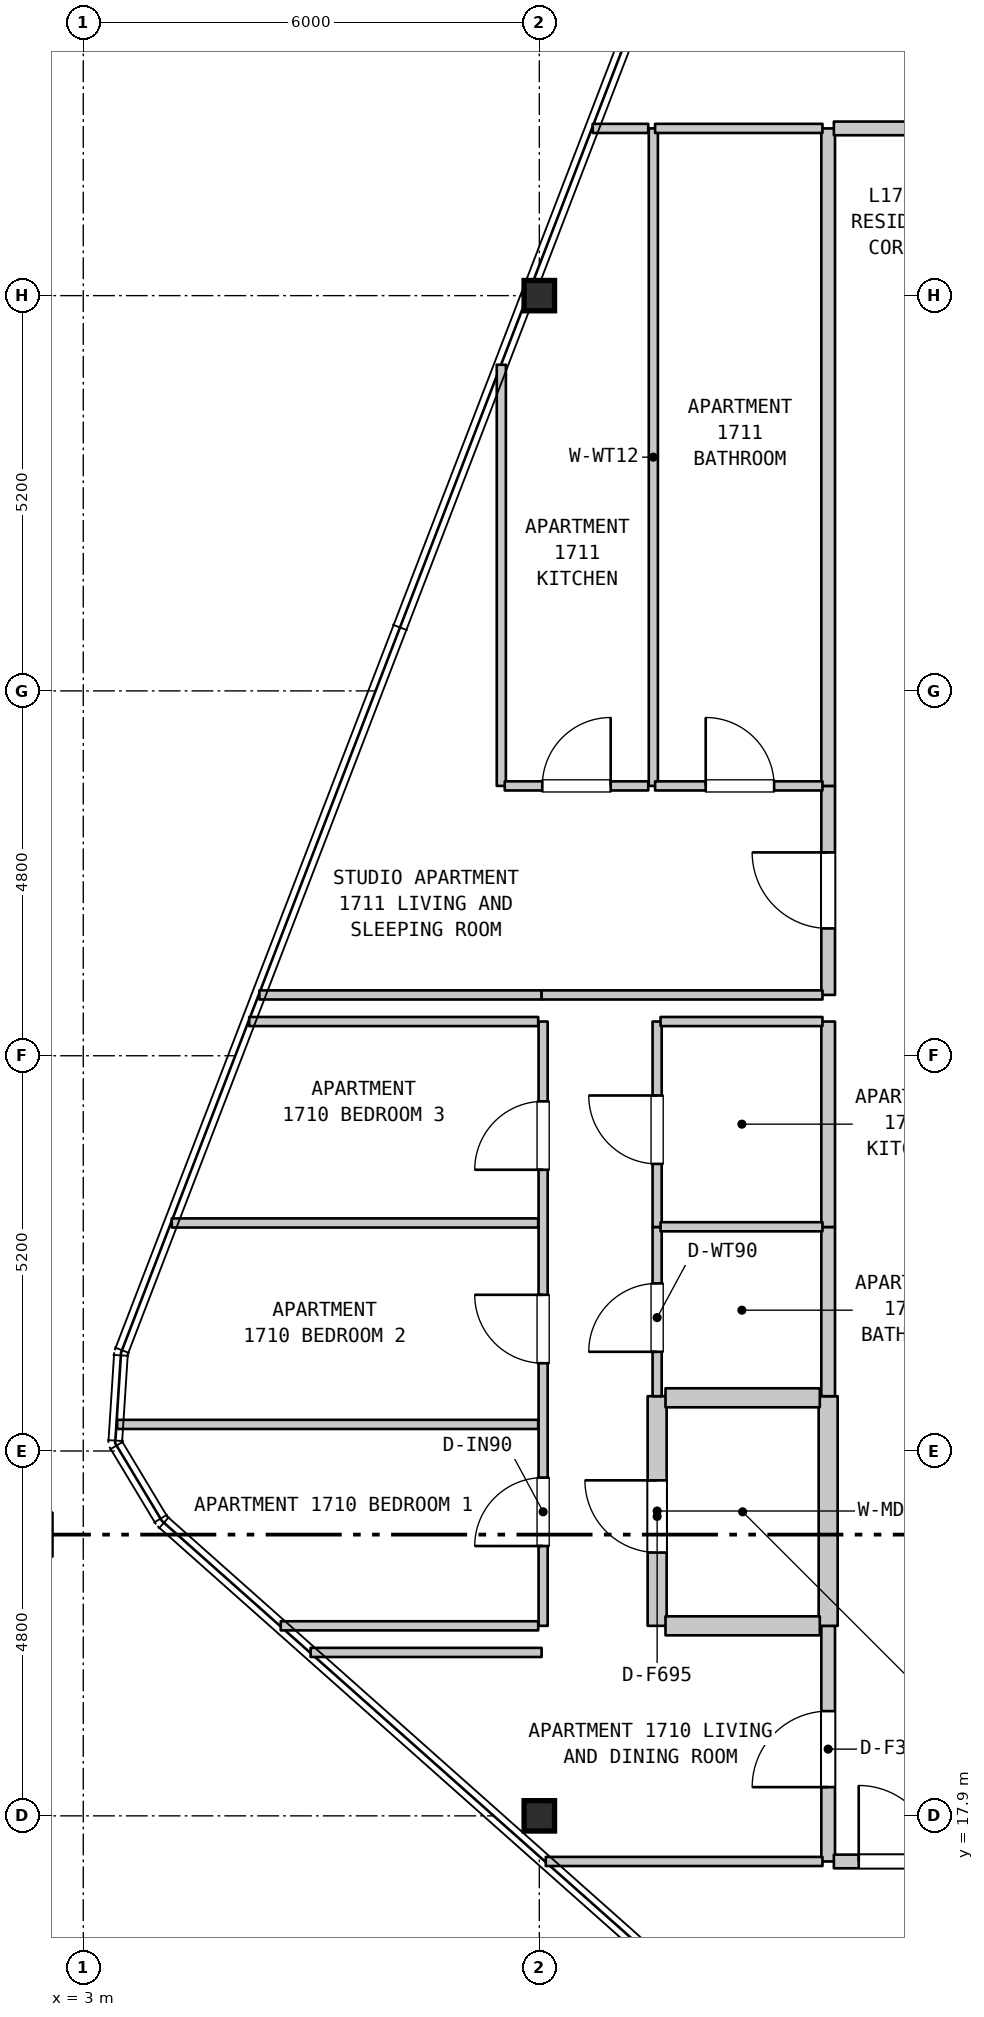
"""IFC4 building model, lengths in metres.
Left out: names, types, materials, properties, quantities, classifications, styles, units other than length and angle.
Written with IfcOpenShell. Run it as: python <this file> out.ifc"""

import sys

from ifc_helpers import new_model, si_unit, direction, frame, frame_2d, origin, origin_2d, place, context, subcontext, project, spatial, rectangle, i_section, extrude, element, fill, save


model = new_model("IFC4")
c1 = context("Model", 3, precision=1e-05, world=origin(), true_north=direction((0.0, 1.0)))
c2 = subcontext(c1, "Body", "Model", "MODEL_VIEW")
j1 = project(units=[si_unit("LENGTHUNIT", "METRE"), si_unit("PLANEANGLEUNIT", "RADIAN")], contexts=[c1])
p1 = place(None, origin())
s1 = spatial("IfcSite", under=j1, at=p1, CompositionType="ELEMENT")
p2 = place(p1, origin())
s2 = spatial("IfcBuilding", under=s1, at=p2, CompositionType="ELEMENT")
p3 = place(p2, frame((0.0, 0.0, 73.8)))
s3 = spatial("IfcBuildingStorey", under=s2, at=p3, CompositionType="ELEMENT", Elevation=73.8)
for number, where, z_axis, x_axis in (
    (1, (9.0, 17.9, 0.0), (0.0, 0.0, 1.0), (1.0, 0.0, 0.0)),
    (2, (9.0, 37.9, 0.0), (0.0, 0.0, 1.0), (1.0, 0.0, 0.0)),
):
    element("IfcColumn", number, at=place(p3, frame(where, z_axis=z_axis, x_axis=x_axis)), inside=s3, PredefinedType="COLUMN", context=c2, shape_type="SweptSolid", body=[
        extrude(i_section(OverallWidth=0.401, OverallDepth=0.399, WebThickness=0.025, FlangeThickness=0.04, FilletRadius=0.015, at=origin_2d()), origin(), (0.0, 0.0, 1.0), 3.7),
    ])
p4 = place(p3, frame((8.5, 31.45, 0.0), z_axis=(0.0, 0.0, 1.0), x_axis=(0.0, 1.0, 0.0)))
e3 = element("IfcWall", 3, at=p4, inside=s3, PredefinedType="PARTITIONING", context=c2, shape_type="SweptSolid", body=[
    extrude(rectangle(XDim=5.54, YDim=0.12, at=frame_2d((2.77, 0.0))), origin(), (0.0, 0.0, 1.0), 3.385),
])
p5 = place(p3, frame((9.05, 20.4, 0.0), z_axis=(0.0, 0.0, 1.0), x_axis=(0.0, 1.0, 0.0)))
e4 = element("IfcWall", 4, at=p5, inside=s3, PredefinedType="PARTITIONING", context=c2, shape_type="SweptSolid", body=[
    extrude(rectangle(XDim=7.95, YDim=0.12, at=frame_2d((3.975, 0.0))), origin(), (0.0, 0.0, 1.0), 2.785),
])
p6 = place(p5, frame((1.05, 0.0, 0.0)))
e5 = element("IfcOpeningElement", 5, at=p6, cuts=e4, PredefinedType="OPENING", context=c2, shape_type="SweptSolid", body=[
    extrude(rectangle(XDim=0.9, YDim=2.15, at=frame_2d((0.45, 1.075))), frame((0.0, 0.07, 0.0), z_axis=(0.0, -1.0, 0.0), x_axis=(1.0, 0.0, 0.0)), (0.0, 0.0, 1.0), 0.14),
])
p7 = place(p5, frame((3.455, 0.0, 0.0)))
e6 = element("IfcOpeningElement", 6, at=p7, cuts=e4, PredefinedType="OPENING", context=c2, shape_type="SweptSolid", body=[
    extrude(rectangle(XDim=0.9, YDim=2.15, at=frame_2d((0.45, 1.075))), frame((0.0, 0.07, 0.0), z_axis=(0.0, -1.0, 0.0), x_axis=(1.0, 0.0, 0.0)), (0.0, 0.0, 1.0), 0.14),
])
p8 = place(p5, frame((6.0, 0.0, 0.0)))
e7 = element("IfcOpeningElement", 7, at=p8, cuts=e4, PredefinedType="OPENING", context=c2, shape_type="SweptSolid", body=[
    extrude(rectangle(XDim=0.9, YDim=2.15, at=frame_2d((0.45, 1.075))), frame((0.0, 0.07, 0.0), z_axis=(0.0, -1.0, 0.0), x_axis=(1.0, 0.0, 0.0)), (0.0, 0.0, 1.0), 0.14),
])
p9 = place(p3, frame((10.5, 31.45, 0.0), z_axis=(0.0, 0.0, 1.0), x_axis=(0.0, 1.0, 0.0)))
e8 = element("IfcWall", 8, at=p9, inside=s3, PredefinedType="PARTITIONING", context=c2, shape_type="SweptSolid", body=[
    extrude(rectangle(XDim=8.65, YDim=0.12, at=frame_2d((4.325, 0.0))), origin(), (0.0, 0.0, 1.0), 3.385),
])
p10 = place(p3, frame((10.55, 20.4, 0.0), z_axis=(0.0, 0.0, 1.0), x_axis=(0.0, 1.0, 0.0)))
e9 = element("IfcWall", 9, at=p10, inside=s3, PredefinedType="STANDARD", context=c2, shape_type="SweptSolid", body=[
    extrude(rectangle(XDim=3.021, YDim=0.25, at=frame_2d((1.51, 0.0))), origin(), (0.0, 0.0, 1.0), 3.385),
])
p11 = place(p10, frame((0.964, 0.0, 0.0)))
e10 = element("IfcOpeningElement", 10, at=p11, cuts=e9, PredefinedType="OPENING", context=c2, shape_type="SweptSolid", body=[
    extrude(rectangle(XDim=0.95, YDim=2.15, at=frame_2d((0.475, 1.075))), frame((0.0, 0.135, 0.0), z_axis=(0.0, -1.0, 0.0), x_axis=(1.0, 0.0, 0.0)), (0.0, 0.0, 1.0), 0.27),
])
p12 = place(p3, frame((10.55, 23.421, 0.0), z_axis=(0.0, 0.0, 1.0), x_axis=(0.0, 1.0, 0.0)))
e11 = element("IfcWall", 11, at=p12, inside=s3, PredefinedType="PARTITIONING", context=c2, shape_type="SweptSolid", body=[
    extrude(rectangle(XDim=2.226, YDim=0.12, at=frame_2d((1.113, 0.0))), origin(), (0.0, 0.0, 1.0), 3.385),
])
p13 = place(p12, frame((0.584, 0.0, 0.0)))
e12 = element("IfcOpeningElement", 12, at=p13, cuts=e11, PredefinedType="OPENING", context=c2, shape_type="SweptSolid", body=[
    extrude(rectangle(XDim=0.9, YDim=2.1, at=frame_2d((0.45, 1.05))), frame((0.0, 0.07, 0.0), z_axis=(0.0, -1.0, 0.0), x_axis=(1.0, 0.0, 0.0)), (0.0, 0.0, 1.0), 0.14),
])
p14 = place(p3, frame((10.55, 25.647, 0.0), z_axis=(0.0, 0.0, 1.0), x_axis=(0.0, 1.0, 0.0)))
e13 = element("IfcWall", 13, at=p14, inside=s3, PredefinedType="PARTITIONING", context=c2, shape_type="SweptSolid", body=[
    extrude(rectangle(XDim=2.703, YDim=0.12, at=frame_2d((1.352, 0.0))), origin(), (0.0, 0.0, 1.0), 3.385),
])
p15 = place(p14, frame((0.83, 0.0, 0.0)))
e14 = element("IfcOpeningElement", 14, at=p15, cuts=e13, PredefinedType="OPENING", context=c2, shape_type="SweptSolid", body=[
    extrude(rectangle(XDim=0.9, YDim=2.15, at=frame_2d((0.45, 1.075))), frame((0.0, 0.07, 0.0), z_axis=(0.0, -1.0, 0.0), x_axis=(1.0, 0.0, 0.0)), (0.0, 0.0, 1.0), 0.14),
])
p16 = place(p3, frame((12.8, 17.3, 0.0), z_axis=(0.0, 0.0, 1.0), x_axis=(0.0, 1.0, 0.0)))
e15 = element("IfcWall", 15, at=p16, inside=s3, PredefinedType="STANDARD", context=c2, shape_type="SweptSolid", body=[
    extrude(rectangle(XDim=3.1, YDim=0.18, at=frame_2d((1.55, 0.0))), origin(), (0.0, 0.0, 1.0), 3.385),
])
p17 = place(p16, frame((0.978, 0.0, 0.0)))
e16 = element("IfcOpeningElement", 16, at=p17, cuts=e15, PredefinedType="OPENING", context=c2, shape_type="SweptSolid", body=[
    extrude(rectangle(XDim=1.0, YDim=2.15, at=frame_2d((0.5, 1.075))), frame((0.0, 0.1, 0.0), z_axis=(0.0, -1.0, 0.0), x_axis=(1.0, 0.0, 0.0)), (0.0, 0.0, 1.0), 0.2),
])
p18 = place(p3, frame((12.8, 20.4, 0.0), z_axis=(0.0, 0.0, 1.0), x_axis=(0.0, 1.0, 0.0)))
e17 = element("IfcWall", 17, at=p18, inside=s3, PredefinedType="STANDARD", context=c2, shape_type="SweptSolid", body=[
    extrude(rectangle(XDim=3.021, YDim=0.25, at=frame_2d((1.51, 0.0))), origin(), (0.0, 0.0, 1.0), 3.385),
])
p19 = place(p3, frame((12.8, 23.421, 0.0), z_axis=(0.0, 0.0, 1.0), x_axis=(0.0, 1.0, 0.0)))
e18 = element("IfcWall", 18, at=p19, inside=s3, PredefinedType="STANDARD", context=c2, shape_type="SweptSolid", body=[
    extrude(rectangle(XDim=2.226, YDim=0.18, at=frame_2d((1.113, 0.0))), origin(), (0.0, 0.0, 1.0), 3.385),
])
p20 = place(p3, frame((12.8, 25.647, 0.0), z_axis=(0.0, 0.0, 1.0), x_axis=(0.0, 1.0, 0.0)))
e19 = element("IfcWall", 19, at=p20, inside=s3, PredefinedType="STANDARD", context=c2, shape_type="SweptSolid", body=[
    extrude(rectangle(XDim=2.703, YDim=0.18, at=frame_2d((1.352, 0.0))), origin(), (0.0, 0.0, 1.0), 3.385),
])
p21 = place(p3, frame((12.8, 28.7, 0.0), z_axis=(0.0, 0.0, 1.0), x_axis=(0.0, 1.0, 0.0)))
e20 = element("IfcWall", 20, at=p21, inside=s3, PredefinedType="STANDARD", context=c2, shape_type="SweptSolid", body=[
    extrude(rectangle(XDim=2.75, YDim=0.18, at=frame_2d((1.375, 0.0))), origin(), (0.0, 0.0, 1.0), 3.385),
])
p22 = place(p21, frame((0.875, 0.0, 0.0)))
e21 = element("IfcOpeningElement", 21, at=p22, cuts=e20, PredefinedType="OPENING", context=c2, shape_type="SweptSolid", body=[
    extrude(rectangle(XDim=1.0, YDim=2.15, at=frame_2d((0.5, 1.075))), frame((0.0, 0.1, 0.0), z_axis=(0.0, -1.0, 0.0), x_axis=(1.0, 0.0, 0.0)), (0.0, 0.0, 1.0), 0.2),
])
p23 = place(p3, frame((12.8, 31.45, 0.0), z_axis=(0.0, 0.0, 1.0), x_axis=(0.0, 1.0, 0.0)))
e22 = element("IfcWall", 22, at=p23, inside=s3, PredefinedType="STANDARD", context=c2, shape_type="SweptSolid", body=[
    extrude(rectangle(XDim=8.65, YDim=0.18, at=frame_2d((4.325, 0.0))), origin(), (0.0, 0.0, 1.0), 3.385),
])
p24 = place(p3, frame((9.085, 17.3, 0.0), z_axis=(0.0, 0.0, 1.0), x_axis=(1.0, 0.0, 0.0)))
e23 = element("IfcWall", 23, at=p24, inside=s3, PredefinedType="PARTITIONING", context=c2, shape_type="SweptSolid", body=[
    extrude(rectangle(XDim=3.64, YDim=0.12, at=frame_2d((1.82, 0.0))), origin(), (0.0, 0.0, 1.0), 3.385),
])
p25 = place(p3, frame((12.875, 17.3, 0.0), z_axis=(0.0, 0.0, 1.0), x_axis=(1.0, 0.0, 0.0)))
e24 = element("IfcWall", 24, at=p25, inside=s3, PredefinedType="STANDARD", context=c2, shape_type="SweptSolid", body=[
    extrude(rectangle(XDim=3.58, YDim=0.18, at=frame_2d((1.79, 0.0))), origin(), (0.0, 0.0, 1.0), 3.385),
])
p26 = place(p25, frame((0.327, 0.0, 0.0)))
e25 = element("IfcOpeningElement", 25, at=p26, cuts=e24, PredefinedType="OPENING", context=c2, shape_type="SweptSolid", body=[
    extrude(rectangle(XDim=1.0, YDim=2.15, at=frame_2d((0.5, 1.075))), frame((0.0, 0.1, 0.0), z_axis=(0.0, -1.0, 0.0), x_axis=(1.0, 0.0, 0.0)), (0.0, 0.0, 1.0), 0.2),
])
p27 = place(p3, frame((5.991, 20.05, 0.0), z_axis=(0.0, 0.0, 1.0), x_axis=(1.0, 0.0, 0.0)))
e26 = element("IfcWall", 26, at=p27, inside=s3, PredefinedType="PARTITIONING", context=c2, shape_type="SweptSolid", body=[
    extrude(rectangle(XDim=3.039, YDim=0.12, at=frame_2d((1.52, 0.0))), origin(), (0.0, 0.0, 1.0), 3.385),
])
p28 = place(p3, frame((5.598, 20.4, 0.0), z_axis=(0.0, 0.0, 1.0), x_axis=(1.0, 0.0, 0.0)))
e27 = element("IfcWall", 27, at=p28, inside=s3, PredefinedType="PARTITIONING", context=c2, shape_type="SweptSolid", body=[
    extrude(rectangle(XDim=3.387, YDim=0.12, at=frame_2d((1.694, 0.0))), origin(), (0.0, 0.0, 1.0), 3.385),
])
p29 = place(p3, frame((10.66, 20.4, 0.0), z_axis=(0.0, 0.0, 1.0), x_axis=(1.0, 0.0, 0.0)))
e28 = element("IfcWall", 28, at=p29, inside=s3, PredefinedType="STANDARD", context=c2, shape_type="SweptSolid", body=[
    extrude(rectangle(XDim=2.03, YDim=0.25, at=frame_2d((1.015, 0.0))), origin(), (0.0, 0.0, 1.0), 3.385),
])
p30 = place(p3, frame((3.446, 23.05, 0.0), z_axis=(0.0, 0.0, 1.0), x_axis=(1.0, 0.0, 0.0)))
e29 = element("IfcWall", 29, at=p30, inside=s3, PredefinedType="PARTITIONING", context=c2, shape_type="SweptSolid", body=[
    extrude(rectangle(XDim=5.539, YDim=0.12, at=frame_2d((2.77, 0.0))), origin(), (0.0, 0.0, 1.0), 3.385),
])
p31 = place(p3, frame((10.66, 23.4, 0.0), z_axis=(0.0, 0.0, 1.0), x_axis=(1.0, 0.0, 0.0)))
e30 = element("IfcWall", 30, at=p31, inside=s3, PredefinedType="STANDARD", context=c2, shape_type="SweptSolid", body=[
    extrude(rectangle(XDim=2.03, YDim=0.25, at=frame_2d((1.015, 0.0))), origin(), (0.0, 0.0, 1.0), 3.385),
])
p32 = place(p3, frame((10.595, 25.65, 0.0), z_axis=(0.0, 0.0, 1.0), x_axis=(1.0, 0.0, 0.0)))
e31 = element("IfcWall", 31, at=p32, inside=s3, PredefinedType="PARTITIONING", context=c2, shape_type="SweptSolid", body=[
    extrude(rectangle(XDim=2.13, YDim=0.12, at=frame_2d((1.065, 0.0))), origin(), (0.0, 0.0, 1.0), 3.385),
])
p33 = place(p3, frame((4.164, 25.7, 0.0), z_axis=(0.0, 0.0, 1.0), x_axis=(1.0, 0.0, 0.0)))
e32 = element("IfcWall", 32, at=p33, inside=s3, PredefinedType="PARTITIONING", context=c2, shape_type="SweptSolid", body=[
    extrude(rectangle(XDim=4.821, YDim=0.12, at=frame_2d((2.411, 0.0))), origin(), (0.0, 0.0, 1.0), 3.385),
])
p34 = place(p3, frame((5.183, 28.35, 0.0), z_axis=(0.0, 0.0, 1.0), x_axis=(1.0, 0.0, 0.0)))
e33 = element("IfcWall", 33, at=p34, inside=s3, PredefinedType="PARTITIONING", context=c2, shape_type="SweptSolid", body=[
    extrude(rectangle(XDim=3.802, YDim=0.12, at=frame_2d((1.901, 0.0))), origin(), (0.0, 0.0, 1.0), 3.385),
])
p35 = place(p3, frame((10.595, 28.35, 0.0), z_axis=(0.0, 0.0, 1.0), x_axis=(1.0, 0.0, 0.0)))
e34 = element("IfcWall", 34, at=p35, inside=s3, PredefinedType="PARTITIONING", context=c2, shape_type="SweptSolid", body=[
    extrude(rectangle(XDim=2.13, YDim=0.12, at=frame_2d((1.065, 0.0))), origin(), (0.0, 0.0, 1.0), 3.385),
])
p36 = place(p3, frame((5.317, 28.7, 0.0), z_axis=(0.0, 0.0, 1.0), x_axis=(1.0, 0.0, 0.0)))
e35 = element("IfcWall", 35, at=p36, inside=s3, PredefinedType="PARTITIONING", context=c2, shape_type="SweptSolid", body=[
    extrude(rectangle(XDim=3.713, YDim=0.12, at=frame_2d((1.856, 0.0))), origin(), (0.0, 0.0, 1.0), 3.385),
])
p37 = place(p3, frame((9.03, 28.7, 0.0), z_axis=(0.0, 0.0, 1.0), x_axis=(1.0, 0.0, 0.0)))
e36 = element("IfcWall", 36, at=p37, inside=s3, PredefinedType="PARTITIONING", context=c2, shape_type="SweptSolid", body=[
    extrude(rectangle(XDim=3.695, YDim=0.12, at=frame_2d((1.848, 0.0))), origin(), (0.0, 0.0, 1.0), 3.385),
])
p38 = place(p3, frame((8.545, 31.45, 0.0), z_axis=(0.0, 0.0, 1.0), x_axis=(1.0, 0.0, 0.0)))
e37 = element("IfcWall", 37, at=p38, inside=s3, PredefinedType="PARTITIONING", context=c2, shape_type="SweptSolid", body=[
    extrude(rectangle(XDim=1.888, YDim=0.12, at=frame_2d((0.944, 0.0))), origin(), (0.0, 0.0, 1.0), 3.385),
])
p39 = place(p38, frame((0.494, 0.0, 0.0)))
e38 = element("IfcOpeningElement", 38, at=p39, cuts=e37, PredefinedType="OPENING", context=c2, shape_type="SweptSolid", body=[
    extrude(rectangle(XDim=0.9, YDim=2.15, at=frame_2d((0.45, 1.075))), frame((0.0, 0.07, 0.0), z_axis=(0.0, -1.0, 0.0), x_axis=(1.0, 0.0, 0.0)), (0.0, 0.0, 1.0), 0.14),
])
p40 = place(p3, frame((10.523, 31.45, 0.0), z_axis=(0.0, 0.0, 1.0), x_axis=(1.0, 0.0, 0.0)))
e39 = element("IfcWall", 39, at=p40, inside=s3, PredefinedType="PARTITIONING", context=c2, shape_type="SweptSolid", body=[
    extrude(rectangle(XDim=2.202, YDim=0.12, at=frame_2d((1.101, 0.0))), origin(), (0.0, 0.0, 1.0), 3.385),
])
p41 = place(p40, frame((0.666, 0.0, 0.0)))
e40 = element("IfcOpeningElement", 40, at=p41, cuts=e39, PredefinedType="OPENING", context=c2, shape_type="SweptSolid", body=[
    extrude(rectangle(XDim=0.9, YDim=2.1, at=frame_2d((0.45, 1.05))), frame((0.0, 0.07, 0.0), z_axis=(0.0, -1.0, 0.0), x_axis=(1.0, 0.0, 0.0)), (0.0, 0.0, 1.0), 0.14),
])
p42 = place(p3, frame((9.702, 40.1, 0.0), z_axis=(0.0, 0.0, 1.0), x_axis=(1.0, 0.0, 0.0)))
e41 = element("IfcWall", 41, at=p42, inside=s3, PredefinedType="PARTITIONING", context=c2, shape_type="SweptSolid", body=[
    extrude(rectangle(XDim=0.731, YDim=0.12, at=frame_2d((0.366, 0.0))), origin(), (0.0, 0.0, 1.0), 3.385),
])
p43 = place(p3, frame((10.523, 40.1, 0.0), z_axis=(0.0, 0.0, 1.0), x_axis=(1.0, 0.0, 0.0)))
e42 = element("IfcWall", 42, at=p43, inside=s3, PredefinedType="PARTITIONING", context=c2, shape_type="SweptSolid", body=[
    extrude(rectangle(XDim=2.202, YDim=0.12, at=frame_2d((1.101, 0.0))), origin(), (0.0, 0.0, 1.0), 3.385),
])
p44 = place(p3, frame((12.875, 40.1, 0.0), z_axis=(0.0, 0.0, 1.0), x_axis=(1.0, 0.0, 0.0)))
e43 = element("IfcWall", 43, at=p44, inside=s3, PredefinedType="STANDARD", context=c2, shape_type="SweptSolid", body=[
    extrude(rectangle(XDim=1.48, YDim=0.18, at=frame_2d((0.74, 0.0))), origin(), (0.0, 0.0, 1.0), 3.385),
])
p45 = place(p6, origin())
e44 = element("IfcDoor", 44, at=p45, inside=s3, OperationType="SINGLE_SWING_LEFT", PredefinedType="DOOR", context=c2, shape_type="SweptSolid", body=[
    extrude(rectangle(XDim=0.9, YDim=2.15, at=frame_2d((0.45, 1.075))), frame((0.0, 0.025, 0.0), z_axis=(0.0, -1.0, 0.0), x_axis=(1.0, 0.0, 0.0)), (0.0, 0.0, 1.0), 0.05),
])
fill(e5, e44)
p46 = place(p7, origin())
e45 = element("IfcDoor", 45, at=p46, inside=s3, OperationType="SINGLE_SWING_RIGHT", PredefinedType="DOOR", context=c2, shape_type="SweptSolid", body=[
    extrude(rectangle(XDim=0.9, YDim=2.15, at=frame_2d((0.45, 1.075))), frame((0.0, 0.025, 0.0), z_axis=(0.0, -1.0, 0.0), x_axis=(1.0, 0.0, 0.0)), (0.0, 0.0, 1.0), 0.05),
])
fill(e6, e45)
p47 = place(p8, origin())
e46 = element("IfcDoor", 46, at=p47, inside=s3, OperationType="SINGLE_SWING_LEFT", PredefinedType="DOOR", context=c2, shape_type="SweptSolid", body=[
    extrude(rectangle(XDim=0.9, YDim=2.15, at=frame_2d((0.45, 1.075))), frame((0.0, 0.025, 0.0), z_axis=(0.0, -1.0, 0.0), x_axis=(1.0, 0.0, 0.0)), (0.0, 0.0, 1.0), 0.05),
])
fill(e7, e46)
p48 = place(p11, origin())
e47 = element("IfcDoor", 47, at=p48, inside=s3, OperationType="SINGLE_SWING_RIGHT", PredefinedType="DOOR", context=c2, shape_type="SweptSolid", body=[
    extrude(rectangle(XDim=0.95, YDim=2.15, at=frame_2d((0.475, 1.075))), frame((0.0, 0.025, 0.0), z_axis=(0.0, -1.0, 0.0), x_axis=(1.0, 0.0, 0.0)), (0.0, 0.0, 1.0), 0.05),
])
fill(e10, e47)
p49 = place(p13, origin())
e48 = element("IfcDoor", 48, at=p49, inside=s3, OperationType="SINGLE_SWING_LEFT", PredefinedType="DOOR", context=c2, shape_type="SweptSolid", body=[
    extrude(rectangle(XDim=0.9, YDim=2.1, at=frame_2d((0.45, 1.05))), frame((0.0, 0.025, 0.0), z_axis=(0.0, -1.0, 0.0), x_axis=(1.0, 0.0, 0.0)), (0.0, 0.0, 1.0), 0.05),
])
fill(e12, e48)
p50 = place(p15, origin())
e49 = element("IfcDoor", 49, at=p50, inside=s3, OperationType="SINGLE_SWING_RIGHT", PredefinedType="DOOR", context=c2, shape_type="SweptSolid", body=[
    extrude(rectangle(XDim=0.9, YDim=2.15, at=frame_2d((0.45, 1.075))), frame((0.0, 0.025, 0.0), z_axis=(0.0, -1.0, 0.0), x_axis=(1.0, 0.0, 0.0)), (0.0, 0.0, 1.0), 0.05),
])
fill(e14, e49)
p51 = place(p17, origin())
e50 = element("IfcDoor", 50, at=p51, inside=s3, OperationType="SINGLE_SWING_LEFT", PredefinedType="DOOR", context=c2, shape_type="SweptSolid", body=[
    extrude(rectangle(XDim=1.0, YDim=2.15, at=frame_2d((0.5, 1.075))), frame((0.0, 0.025, 0.0), z_axis=(0.0, -1.0, 0.0), x_axis=(1.0, 0.0, 0.0)), (0.0, 0.0, 1.0), 0.05),
])
fill(e16, e50)
p52 = place(p22, origin())
e51 = element("IfcDoor", 51, at=p52, inside=s3, OperationType="SINGLE_SWING_RIGHT", PredefinedType="DOOR", context=c2, shape_type="SweptSolid", body=[
    extrude(rectangle(XDim=1.0, YDim=2.15, at=frame_2d((0.5, 1.075))), frame((0.0, 0.025, 0.0), z_axis=(0.0, -1.0, 0.0), x_axis=(1.0, 0.0, 0.0)), (0.0, 0.0, 1.0), 0.05),
])
fill(e21, e51)
p53 = place(p26, origin())
e52 = element("IfcDoor", 52, at=p53, inside=s3, OperationType="SINGLE_SWING_LEFT", PredefinedType="DOOR", context=c2, shape_type="SweptSolid", body=[
    extrude(rectangle(XDim=1.0, YDim=2.15, at=frame_2d((0.5, 1.075))), frame((0.0, 0.025, 0.0), z_axis=(0.0, -1.0, 0.0), x_axis=(1.0, 0.0, 0.0)), (0.0, 0.0, 1.0), 0.05),
])
fill(e25, e52)
p54 = place(p39, origin())
e53 = element("IfcDoor", 53, at=p54, inside=s3, OperationType="SINGLE_SWING_RIGHT", PredefinedType="DOOR", context=c2, shape_type="SweptSolid", body=[
    extrude(rectangle(XDim=0.9, YDim=2.15, at=frame_2d((0.45, 1.075))), frame((0.0, 0.025, 0.0), z_axis=(0.0, -1.0, 0.0), x_axis=(1.0, 0.0, 0.0)), (0.0, 0.0, 1.0), 0.05),
])
fill(e38, e53)
p55 = place(p41, origin())
e54 = element("IfcDoor", 54, at=p55, inside=s3, OperationType="SINGLE_SWING_LEFT", PredefinedType="DOOR", context=c2, shape_type="SweptSolid", body=[
    extrude(rectangle(XDim=0.9, YDim=2.1, at=frame_2d((0.45, 1.05))), frame((0.0, 0.025, 0.0), z_axis=(0.0, -1.0, 0.0), x_axis=(1.0, 0.0, 0.0)), (0.0, 0.0, 1.0), 0.05),
])
fill(e40, e54)
save(model, sys.argv[1])
